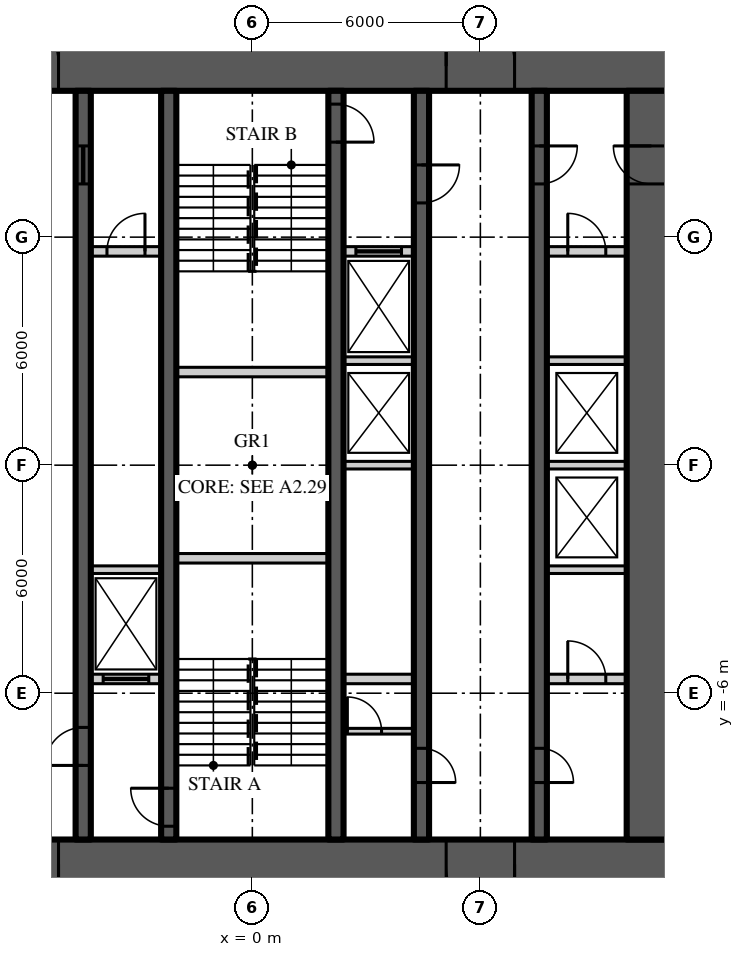
"""IFC4 building model, lengths in metres.
Left out: names, types, materials, properties, quantities, classifications, styles, units other than length and angle.
Written with IfcOpenShell. Run it as: python <this file> out.ifc"""

import sys

from ifc_helpers import new_model, si_unit, direction, frame, frame_2d, origin, place, context, subcontext, project, spatial, rectangle, extrude, element, fill, save


model = new_model("IFC4")
c1 = context("Model", 3, precision=1e-05, world=origin(), true_north=direction((0.0, 1.0)))
c2 = subcontext(c1, "Body", "Model", "MODEL_VIEW")
j1 = project(units=[si_unit("LENGTHUNIT", "METRE"), si_unit("PLANEANGLEUNIT", "RADIAN")], contexts=[c1])
p1 = place(None, origin())
s1 = spatial("IfcSite", under=j1, at=p1, CompositionType="ELEMENT")
p2 = place(p1, origin())
s2 = spatial("IfcBuilding", under=s1, at=p2, CompositionType="ELEMENT")
p3 = place(p2, frame((0.0, 0.0, 208.8)))
s3 = spatial("IfcBuildingStorey", under=s2, at=p3, CompositionType="ELEMENT", Elevation=208.8)
p4 = place(p3, frame((-11.15, 10.5, 0.0), z_axis=(0.0, 0.0, 1.0), x_axis=(1.0, 0.0, 0.0)))
e1 = element("IfcWall", 1, at=p4, inside=s3, PredefinedType="SHEAR", context=c2, shape_type="SweptSolid", body=[
    extrude(rectangle(XDim=22.3, YDim=1.3, at=frame_2d((11.15, 0.0))), origin(), (0.0, 0.0, 1.0), 3.9),
])
p5 = place(p4, frame((4.25, 0.0, 0.0)))
e2 = element("IfcOpeningElement", 2, at=p5, cuts=e1, PredefinedType="OPENING", context=c2, shape_type="SweptSolid", body=[
    extrude(rectangle(XDim=1.8, YDim=2.2, at=frame_2d((0.9, 1.1))), frame((0.0, 0.66, 0.0), z_axis=(0.0, -1.0, 0.0), x_axis=(1.0, 0.0, 0.0)), (0.0, 0.0, 1.0), 1.32),
])
p6 = place(p4, frame((16.25, 0.0, 0.0)))
e3 = element("IfcOpeningElement", 3, at=p6, cuts=e1, PredefinedType="OPENING", context=c2, shape_type="SweptSolid", body=[
    extrude(rectangle(XDim=1.8, YDim=2.2, at=frame_2d((0.9, 1.1))), frame((0.0, 0.66, 0.0), z_axis=(0.0, -1.0, 0.0), x_axis=(1.0, 0.0, 0.0)), (0.0, 0.0, 1.0), 1.32),
])
p7 = place(p3, frame((11.15, -10.5, 0.0), z_axis=(0.0, 0.0, 1.0), x_axis=(-1.0, 0.0, 0.0)))
e4 = element("IfcWall", 4, at=p7, inside=s3, PredefinedType="SHEAR", context=c2, shape_type="SweptSolid", body=[
    extrude(rectangle(XDim=22.3, YDim=1.3, at=frame_2d((11.15, 0.0))), origin(), (0.0, 0.0, 1.0), 3.9),
])
p8 = place(p7, frame((16.25, 0.0, 0.0)))
e5 = element("IfcOpeningElement", 5, at=p8, cuts=e4, PredefinedType="OPENING", context=c2, shape_type="SweptSolid", body=[
    extrude(rectangle(XDim=1.8, YDim=2.2, at=frame_2d((0.9, 1.1))), frame((0.0, 0.66, 0.0), z_axis=(0.0, -1.0, 0.0), x_axis=(1.0, 0.0, 0.0)), (0.0, 0.0, 1.0), 1.32),
])
p9 = place(p7, frame((4.25, 0.0, 0.0)))
e6 = element("IfcOpeningElement", 6, at=p9, cuts=e4, PredefinedType="OPENING", context=c2, shape_type="SweptSolid", body=[
    extrude(rectangle(XDim=1.8, YDim=2.2, at=frame_2d((0.9, 1.1))), frame((0.0, 0.66, 0.0), z_axis=(0.0, -1.0, 0.0), x_axis=(1.0, 0.0, 0.0)), (0.0, 0.0, 1.0), 1.32),
])
p10 = place(p3, frame((10.5, -9.85, 0.0), z_axis=(0.0, 0.0, 1.0), x_axis=(0.0, 1.0, 0.0)))
e7 = element("IfcWall", 7, at=p10, inside=s3, PredefinedType="SHEAR", context=c2, shape_type="SweptSolid", body=[
    extrude(rectangle(XDim=19.7, YDim=1.3, at=frame_2d((9.85, 0.0))), origin(), (0.0, 0.0, 1.0), 3.9),
])
p11 = place(p10, frame((17.25, 0.0, 0.0)))
e8 = element("IfcOpeningElement", 8, at=p11, cuts=e7, PredefinedType="OPENING", context=c2, shape_type="SweptSolid", body=[
    extrude(rectangle(XDim=1.0, YDim=2.2, at=frame_2d((0.5, 1.1))), frame((0.0, 0.66, 0.0), z_axis=(0.0, -1.0, 0.0), x_axis=(1.0, 0.0, 0.0)), (0.0, 0.0, 1.0), 1.32),
])
p12 = place(p3, frame((7.55, 9.85, 0.0), z_axis=(0.0, 0.0, 1.0), x_axis=(0.0, -1.0, 0.0)))
e9 = element("IfcWall", 9, at=p12, inside=s3, PredefinedType="SHEAR", context=c2, shape_type="SweptSolid", body=[
    extrude(rectangle(XDim=19.7, YDim=0.4, at=frame_2d((9.85, 0.0))), origin(), (0.0, 0.0, 1.0), 3.9),
])
p13 = place(p12, frame((1.45, 0.0, 0.0)))
e10 = element("IfcOpeningElement", 10, at=p13, cuts=e9, PredefinedType="OPENING", context=c2, shape_type="SweptSolid", body=[
    extrude(rectangle(XDim=1.0, YDim=2.2, at=frame_2d((0.5, 1.1))), frame((0.0, 0.21, 0.0), z_axis=(0.0, -1.0, 0.0), x_axis=(1.0, 0.0, 0.0)), (0.0, 0.0, 1.0), 0.42),
])
p14 = place(p12, frame((17.3, 0.0, 0.0)))
e11 = element("IfcOpeningElement", 11, at=p14, cuts=e9, PredefinedType="OPENING", context=c2, shape_type="SweptSolid", body=[
    extrude(rectangle(XDim=0.9, YDim=2.1, at=frame_2d((0.45, 1.05))), frame((0.0, 0.21, 0.0), z_axis=(0.0, -1.0, 0.0), x_axis=(1.0, 0.0, 0.0)), (0.0, 0.0, 1.0), 0.42),
])
p15 = place(p3, frame((-4.45, -9.85, 0.0), z_axis=(0.0, 0.0, 1.0), x_axis=(0.0, 1.0, 0.0)))
e12 = element("IfcWall", 12, at=p15, inside=s3, PredefinedType="SHEAR", context=c2, shape_type="SweptSolid", body=[
    extrude(rectangle(XDim=19.7, YDim=0.4, at=frame_2d((9.85, 0.0))), origin(), (0.0, 0.0, 1.0), 3.9),
])
p16 = place(p15, frame((1.95, 0.0, 0.0)))
e13 = element("IfcOpeningElement", 13, at=p16, cuts=e12, PredefinedType="OPENING", context=c2, shape_type="SweptSolid", body=[
    extrude(rectangle(XDim=1.0, YDim=2.2, at=frame_2d((0.5, 1.1))), frame((0.0, 0.21, 0.0), z_axis=(0.0, -1.0, 0.0), x_axis=(1.0, 0.0, 0.0)), (0.0, 0.0, 1.0), 0.42),
])
p17 = place(p15, frame((17.25, 0.0, 0.0)))
e14 = element("IfcOpeningElement", 14, at=p17, cuts=e12, PredefinedType="OPENING", context=c2, shape_type="SweptSolid", body=[
    extrude(rectangle(XDim=1.0, YDim=2.1, at=frame_2d((0.5, 1.05))), frame((0.0, 0.21, 0.0), z_axis=(0.0, -1.0, 0.0), x_axis=(1.0, 0.0, 0.0)), (0.0, 0.0, 1.0), 0.42),
])
p18 = place(p3, frame((4.45, 9.85, 0.0), z_axis=(0.0, 0.0, 1.0), x_axis=(0.0, -1.0, 0.0)))
e15 = element("IfcWall", 15, at=p18, inside=s3, PredefinedType="SHEAR", context=c2, shape_type="SweptSolid", body=[
    extrude(rectangle(XDim=19.7, YDim=0.4, at=frame_2d((9.85, 0.0))), origin(), (0.0, 0.0, 1.0), 3.9),
])
p19 = place(p18, frame((1.95, 0.0, 0.0)))
e16 = element("IfcOpeningElement", 16, at=p19, cuts=e15, PredefinedType="OPENING", context=c2, shape_type="SweptSolid", body=[
    extrude(rectangle(XDim=1.0, YDim=2.2, at=frame_2d((0.5, 1.1))), frame((0.0, 0.21, 0.0), z_axis=(0.0, -1.0, 0.0), x_axis=(1.0, 0.0, 0.0)), (0.0, 0.0, 1.0), 0.42),
])
p20 = place(p18, frame((17.3, 0.0, 0.0)))
e17 = element("IfcOpeningElement", 17, at=p20, cuts=e15, PredefinedType="OPENING", context=c2, shape_type="SweptSolid", body=[
    extrude(rectangle(XDim=0.9, YDim=2.1, at=frame_2d((0.45, 1.05))), frame((0.0, 0.21, 0.0), z_axis=(0.0, -1.0, 0.0), x_axis=(1.0, 0.0, 0.0)), (0.0, 0.0, 1.0), 0.42),
])
p21 = place(p3, frame((-2.2, -9.85, 0.0), z_axis=(0.0, 0.0, 1.0), x_axis=(0.0, 1.0, 0.0)))
e18 = element("IfcWall", 18, at=p21, inside=s3, PredefinedType="SHEAR", context=c2, shape_type="SweptSolid", body=[
    extrude(rectangle(XDim=19.7, YDim=0.4, at=frame_2d((9.85, 0.0))), origin(), (0.0, 0.0, 1.0), 3.9),
])
p22 = place(p21, frame((0.35, 0.0, 0.0)))
e19 = element("IfcOpeningElement", 19, at=p22, cuts=e18, PredefinedType="OPENING", context=c2, shape_type="SweptSolid", body=[
    extrude(rectangle(XDim=1.0, YDim=2.2, at=frame_2d((0.5, 1.1))), frame((0.0, 0.21, 0.0), z_axis=(0.0, -1.0, 0.0), x_axis=(1.0, 0.0, 0.0)), (0.0, 0.0, 1.0), 0.42),
])
p23 = place(p3, frame((2.2, 9.85, 0.0), z_axis=(0.0, 0.0, 1.0), x_axis=(0.0, -1.0, 0.0)))
e20 = element("IfcWall", 20, at=p23, inside=s3, PredefinedType="SHEAR", context=c2, shape_type="SweptSolid", body=[
    extrude(rectangle(XDim=19.7, YDim=0.4, at=frame_2d((9.85, 0.0))), origin(), (0.0, 0.0, 1.0), 3.9),
])
p24 = place(p23, frame((0.35, 0.0, 0.0)))
e21 = element("IfcOpeningElement", 21, at=p24, cuts=e20, PredefinedType="OPENING", context=c2, shape_type="SweptSolid", body=[
    extrude(rectangle(XDim=1.0, YDim=2.2, at=frame_2d((0.5, 1.1))), frame((0.0, 0.21, 0.0), z_axis=(0.0, -1.0, 0.0), x_axis=(1.0, 0.0, 0.0)), (0.0, 0.0, 1.0), 0.42),
])
p25 = place(p3, frame((-4.25, 5.625, 0.0), z_axis=(0.0, 0.0, 1.0), x_axis=(1.0, 0.0, 0.0)))
e22 = element("IfcWall", 22, at=p25, inside=s3, PredefinedType="SOLIDWALL", context=c2, shape_type="SweptSolid", body=[
    extrude(rectangle(XDim=1.85, YDim=0.25, at=frame_2d((0.925, 0.0))), origin(), (0.0, 0.0, 1.0), 3.7),
])
p26 = place(p25, frame((0.425, 0.0, 0.0)))
e23 = element("IfcOpeningElement", 23, at=p26, cuts=e22, PredefinedType="OPENING", context=c2, shape_type="SweptSolid", body=[
    extrude(rectangle(XDim=1.0, YDim=2.2, at=frame_2d((0.5, 1.1))), frame((0.0, 0.135, 0.0), z_axis=(0.0, -1.0, 0.0), x_axis=(1.0, 0.0, 0.0)), (0.0, 0.0, 1.0), 0.27),
])
p27 = place(p3, frame((2.4, 5.625, 0.0), z_axis=(0.0, 0.0, 1.0), x_axis=(1.0, 0.0, 0.0)))
e24 = element("IfcWall", 24, at=p27, inside=s3, PredefinedType="SOLIDWALL", context=c2, shape_type="SweptSolid", body=[
    extrude(rectangle(XDim=1.85, YDim=0.25, at=frame_2d((0.925, 0.0))), origin(), (0.0, 0.0, 1.0), 3.7),
])
p28 = place(p27, frame((0.325, 0.0, 0.0)))
e25 = element("IfcOpeningElement", 25, at=p28, cuts=e24, PredefinedType="OPENING", context=c2, shape_type="SweptSolid", body=[
    extrude(rectangle(XDim=1.2, YDim=2.2, at=frame_2d((0.6, 1.1))), frame((0.0, 0.135, 0.0), z_axis=(0.0, -1.0, 0.0), x_axis=(1.0, 0.0, 0.0)), (0.0, 0.0, 1.0), 0.27),
])
p29 = place(p3, frame((7.75, 5.625, 0.0), z_axis=(0.0, 0.0, 1.0), x_axis=(1.0, 0.0, 0.0)))
e26 = element("IfcWall", 26, at=p29, inside=s3, PredefinedType="SOLIDWALL", context=c2, shape_type="SweptSolid", body=[
    extrude(rectangle(XDim=2.1, YDim=0.25, at=frame_2d((1.05, 0.0))), origin(), (0.0, 0.0, 1.0), 3.7),
])
p30 = place(p29, frame((0.55, 0.0, 0.0)))
e27 = element("IfcOpeningElement", 27, at=p30, cuts=e26, PredefinedType="OPENING", context=c2, shape_type="SweptSolid", body=[
    extrude(rectangle(XDim=1.0, YDim=2.2, at=frame_2d((0.5, 1.1))), frame((0.0, 0.135, 0.0), z_axis=(0.0, -1.0, 0.0), x_axis=(1.0, 0.0, 0.0)), (0.0, 0.0, 1.0), 0.27),
])
p31 = place(p3, frame((-4.25, -5.625, 0.0), z_axis=(0.0, 0.0, 1.0), x_axis=(1.0, 0.0, 0.0)))
e28 = element("IfcWall", 28, at=p31, inside=s3, PredefinedType="SOLIDWALL", context=c2, shape_type="SweptSolid", body=[
    extrude(rectangle(XDim=1.85, YDim=0.25, at=frame_2d((0.925, 0.0))), origin(), (0.0, 0.0, 1.0), 3.7),
])
p32 = place(p31, frame((0.325, 0.0, 0.0)))
e29 = element("IfcOpeningElement", 29, at=p32, cuts=e28, PredefinedType="OPENING", context=c2, shape_type="SweptSolid", body=[
    extrude(rectangle(XDim=1.2, YDim=2.2, at=frame_2d((0.6, 1.1))), frame((0.0, 0.135, 0.0), z_axis=(0.0, -1.0, 0.0), x_axis=(1.0, 0.0, 0.0)), (0.0, 0.0, 1.0), 0.27),
])
p33 = place(p3, frame((2.4, -5.625, 0.0), z_axis=(0.0, 0.0, 1.0), x_axis=(1.0, 0.0, 0.0)))
e30 = element("IfcWall", 30, at=p33, inside=s3, PredefinedType="SOLIDWALL", context=c2, shape_type="SweptSolid", body=[
    extrude(rectangle(XDim=1.85, YDim=0.25, at=frame_2d((0.925, 0.0))), origin(), (0.0, 0.0, 1.0), 3.7),
])
p34 = place(p3, frame((7.75, -5.625, 0.0), z_axis=(0.0, 0.0, 1.0), x_axis=(1.0, 0.0, 0.0)))
e31 = element("IfcWall", 31, at=p34, inside=s3, PredefinedType="SOLIDWALL", context=c2, shape_type="SweptSolid", body=[
    extrude(rectangle(XDim=2.1, YDim=0.25, at=frame_2d((1.05, 0.0))), origin(), (0.0, 0.0, 1.0), 3.7),
])
p35 = place(p34, frame((0.55, 0.0, 0.0)))
e32 = element("IfcOpeningElement", 32, at=p35, cuts=e31, PredefinedType="OPENING", context=c2, shape_type="SweptSolid", body=[
    extrude(rectangle(XDim=1.0, YDim=2.2, at=frame_2d((0.5, 1.1))), frame((0.0, 0.135, 0.0), z_axis=(0.0, -1.0, 0.0), x_axis=(1.0, 0.0, 0.0)), (0.0, 0.0, 1.0), 0.27),
])
for number, where, z_axis, x_axis in (
    (33, (-2.0, -2.45, 0.0), (0.0, 0.0, 1.0), (1.0, 0.0, 0.0)),
    (34, (-2.0, 2.45, 0.0), (0.0, 0.0, 1.0), (1.0, 0.0, 0.0)),
):
    element("IfcWall", number, at=place(p3, frame(where, z_axis=z_axis, x_axis=x_axis)), inside=s3, PredefinedType="SOLIDWALL", context=c2, shape_type="SweptSolid", body=[
        extrude(rectangle(XDim=4.0, YDim=0.25, at=frame_2d((2.0, 0.0))), origin(), (0.0, 0.0, 1.0), 3.7),
    ])
p36 = place(p3, frame((-4.25, -2.75, 0.0), z_axis=(0.0, 0.0, 1.0), x_axis=(1.0, 0.0, 0.0)))
e35 = element("IfcWall", 35, at=p36, inside=s3, PredefinedType="SOLIDWALL", context=c2, shape_type="SweptSolid", body=[
    extrude(rectangle(XDim=1.85, YDim=0.2, at=frame_2d((0.925, 0.0))), origin(), (0.0, 0.0, 1.0), 3.7),
])
p37 = place(p3, frame((7.75, -2.75, 0.0), z_axis=(0.0, 0.0, 1.0), x_axis=(1.0, 0.0, 0.0)))
e36 = element("IfcWall", 36, at=p37, inside=s3, PredefinedType="SOLIDWALL", context=c2, shape_type="SweptSolid", body=[
    extrude(rectangle(XDim=2.1, YDim=0.2, at=frame_2d((1.05, 0.0))), origin(), (0.0, 0.0, 1.0), 3.7),
])
p38 = place(p3, frame((2.4, 0.0, 0.0), z_axis=(0.0, 0.0, 1.0), x_axis=(1.0, 0.0, 0.0)))
e37 = element("IfcWall", 37, at=p38, inside=s3, PredefinedType="SOLIDWALL", context=c2, shape_type="SweptSolid", body=[
    extrude(rectangle(XDim=1.85, YDim=0.2, at=frame_2d((0.925, 0.0))), origin(), (0.0, 0.0, 1.0), 3.7),
])
p39 = place(p3, frame((7.75, 0.0, 0.0), z_axis=(0.0, 0.0, 1.0), x_axis=(1.0, 0.0, 0.0)))
e38 = element("IfcWall", 38, at=p39, inside=s3, PredefinedType="SOLIDWALL", context=c2, shape_type="SweptSolid", body=[
    extrude(rectangle(XDim=2.1, YDim=0.2, at=frame_2d((1.05, 0.0))), origin(), (0.0, 0.0, 1.0), 3.7),
])
p40 = place(p3, frame((2.4, 2.75, 0.0), z_axis=(0.0, 0.0, 1.0), x_axis=(1.0, 0.0, 0.0)))
e39 = element("IfcWall", 39, at=p40, inside=s3, PredefinedType="SOLIDWALL", context=c2, shape_type="SweptSolid", body=[
    extrude(rectangle(XDim=1.85, YDim=0.2, at=frame_2d((0.925, 0.0))), origin(), (0.0, 0.0, 1.0), 3.7),
])
p41 = place(p3, frame((7.75, 2.75, 0.0), z_axis=(0.0, 0.0, 1.0), x_axis=(1.0, 0.0, 0.0)))
e40 = element("IfcWall", 40, at=p41, inside=s3, PredefinedType="SOLIDWALL", context=c2, shape_type="SweptSolid", body=[
    extrude(rectangle(XDim=2.1, YDim=0.2, at=frame_2d((1.05, 0.0))), origin(), (0.0, 0.0, 1.0), 3.7),
])
p42 = place(p3, frame((2.4, -7.0, 0.0), z_axis=(0.0, 0.0, 1.0), x_axis=(1.0, 0.0, 0.0)))
e41 = element("IfcWall", 41, at=p42, inside=s3, PredefinedType="SOLIDWALL", context=c2, shape_type="SweptSolid", body=[
    extrude(rectangle(XDim=1.85, YDim=0.15, at=frame_2d((0.925, 0.0))), origin(), (0.0, 0.0, 1.0), 3.77),
])
p43 = place(p42, frame((0.1, 0.0, 0.0)))
e42 = element("IfcOpeningElement", 42, at=p43, cuts=e41, PredefinedType="OPENING", context=c2, shape_type="SweptSolid", body=[
    extrude(rectangle(XDim=0.9, YDim=2.1, at=frame_2d((0.45, 1.05))), frame((0.0, 0.085, 0.0), z_axis=(0.0, -1.0, 0.0), x_axis=(1.0, 0.0, 0.0)), (0.0, 0.0, 1.0), 0.17),
])
p44 = place(p5, origin())
e43 = element("IfcDoor", 43, at=p44, inside=s3, OperationType="DOUBLE_DOOR_DOUBLE_SWING", PredefinedType="DOOR", context=c2, shape_type="SweptSolid", body=[
    extrude(rectangle(XDim=1.8, YDim=2.2, at=frame_2d((0.9, 1.1))), frame((0.0, 0.025, 0.0), z_axis=(0.0, -1.0, 0.0), x_axis=(1.0, 0.0, 0.0)), (0.0, 0.0, 1.0), 0.05),
])
fill(e2, e43)
p45 = place(p8, origin())
e44 = element("IfcDoor", 44, at=p45, inside=s3, OperationType="DOUBLE_DOOR_DOUBLE_SWING", PredefinedType="DOOR", context=c2, shape_type="SweptSolid", body=[
    extrude(rectangle(XDim=1.8, YDim=2.2, at=frame_2d((0.9, 1.1))), frame((0.0, 0.025, 0.0), z_axis=(0.0, -1.0, 0.0), x_axis=(1.0, 0.0, 0.0)), (0.0, 0.0, 1.0), 0.05),
])
fill(e5, e44)
p46 = place(p6, origin())
e45 = element("IfcDoor", 45, at=p46, inside=s3, OperationType="DOUBLE_DOOR_DOUBLE_SWING", PredefinedType="DOOR", context=c2, shape_type="SweptSolid", body=[
    extrude(rectangle(XDim=1.8, YDim=2.2, at=frame_2d((0.9, 1.1))), frame((0.0, 0.025, 0.0), z_axis=(0.0, -1.0, 0.0), x_axis=(1.0, 0.0, 0.0)), (0.0, 0.0, 1.0), 0.05),
])
fill(e3, e45)
p47 = place(p9, origin())
e46 = element("IfcDoor", 46, at=p47, inside=s3, OperationType="DOUBLE_DOOR_DOUBLE_SWING", PredefinedType="DOOR", context=c2, shape_type="SweptSolid", body=[
    extrude(rectangle(XDim=1.8, YDim=2.2, at=frame_2d((0.9, 1.1))), frame((0.0, 0.025, 0.0), z_axis=(0.0, -1.0, 0.0), x_axis=(1.0, 0.0, 0.0)), (0.0, 0.0, 1.0), 0.05),
])
fill(e6, e46)
p48 = place(p13, origin())
e47 = element("IfcDoor", 47, at=p48, inside=s3, OperationType="SINGLE_SWING_LEFT", PredefinedType="DOOR", context=c2, shape_type="SweptSolid", body=[
    extrude(rectangle(XDim=1.0, YDim=2.2, at=frame_2d((0.5, 1.1))), frame((0.0, 0.025, 0.0), z_axis=(0.0, -1.0, 0.0), x_axis=(1.0, 0.0, 0.0)), (0.0, 0.0, 1.0), 0.05),
])
fill(e10, e47)
p49 = place(p11, origin())
e48 = element("IfcDoor", 48, at=p49, inside=s3, OperationType="SINGLE_SWING_RIGHT", PredefinedType="DOOR", context=c2, shape_type="SweptSolid", body=[
    extrude(rectangle(XDim=1.0, YDim=2.2, at=frame_2d((0.5, 1.1))), frame((0.0, 0.025, 0.0), z_axis=(0.0, -1.0, 0.0), x_axis=(1.0, 0.0, 0.0)), (0.0, 0.0, 1.0), 0.05),
])
fill(e8, e48)
p50 = place(p16, origin())
e49 = element("IfcDoor", 49, at=p50, inside=s3, OperationType="SINGLE_SWING_LEFT", PredefinedType="DOOR", context=c2, shape_type="SweptSolid", body=[
    extrude(rectangle(XDim=1.0, YDim=2.2, at=frame_2d((0.5, 1.1))), frame((0.0, 0.025, 0.0), z_axis=(0.0, -1.0, 0.0), x_axis=(1.0, 0.0, 0.0)), (0.0, 0.0, 1.0), 0.05),
])
fill(e13, e49)
p51 = place(p22, origin())
e50 = element("IfcDoor", 50, at=p51, inside=s3, OperationType="SINGLE_SWING_RIGHT", PredefinedType="DOOR", context=c2, shape_type="SweptSolid", body=[
    extrude(rectangle(XDim=1.0, YDim=2.2, at=frame_2d((0.5, 1.1))), frame((0.0, 0.025, 0.0), z_axis=(0.0, -1.0, 0.0), x_axis=(1.0, 0.0, 0.0)), (0.0, 0.0, 1.0), 0.05),
])
fill(e19, e50)
p52 = place(p19, origin())
e51 = element("IfcDoor", 51, at=p52, inside=s3, OperationType="SINGLE_SWING_LEFT", PredefinedType="DOOR", context=c2, shape_type="SweptSolid", body=[
    extrude(rectangle(XDim=1.0, YDim=2.2, at=frame_2d((0.5, 1.1))), frame((0.0, 0.025, 0.0), z_axis=(0.0, -1.0, 0.0), x_axis=(1.0, 0.0, 0.0)), (0.0, 0.0, 1.0), 0.05),
])
fill(e16, e51)
p53 = place(p24, origin())
e52 = element("IfcDoor", 52, at=p53, inside=s3, OperationType="SINGLE_SWING_RIGHT", PredefinedType="DOOR", context=c2, shape_type="SweptSolid", body=[
    extrude(rectangle(XDim=1.0, YDim=2.2, at=frame_2d((0.5, 1.1))), frame((0.0, 0.025, 0.0), z_axis=(0.0, -1.0, 0.0), x_axis=(1.0, 0.0, 0.0)), (0.0, 0.0, 1.0), 0.05),
])
fill(e21, e52)
p54 = place(p17, origin())
e53 = element("IfcDoor", 53, at=p54, inside=s3, OperationType="SLIDING_TO_LEFT", PredefinedType="DOOR", context=c2, shape_type="SweptSolid", body=[
    extrude(rectangle(XDim=1.0, YDim=2.1, at=frame_2d((0.5, 1.05))), frame((0.0, 0.025, 0.0), z_axis=(0.0, -1.0, 0.0), x_axis=(1.0, 0.0, 0.0)), (0.0, 0.0, 1.0), 0.05),
])
fill(e14, e53)
p55 = place(p14, origin())
e54 = element("IfcDoor", 54, at=p55, inside=s3, OperationType="SINGLE_SWING_RIGHT", PredefinedType="DOOR", context=c2, shape_type="SweptSolid", body=[
    extrude(rectangle(XDim=0.9, YDim=2.1, at=frame_2d((0.45, 1.05))), frame((0.0, 0.025, 0.0), z_axis=(0.0, -1.0, 0.0), x_axis=(1.0, 0.0, 0.0)), (0.0, 0.0, 1.0), 0.05),
])
fill(e11, e54)
p56 = place(p20, origin())
e55 = element("IfcDoor", 55, at=p56, inside=s3, OperationType="SINGLE_SWING_RIGHT", PredefinedType="DOOR", context=c2, shape_type="SweptSolid", body=[
    extrude(rectangle(XDim=0.9, YDim=2.1, at=frame_2d((0.45, 1.05))), frame((0.0, 0.025, 0.0), z_axis=(0.0, -1.0, 0.0), x_axis=(1.0, 0.0, 0.0)), (0.0, 0.0, 1.0), 0.05),
])
fill(e17, e55)
p57 = place(p32, origin())
e56 = element("IfcDoor", 56, at=p57, inside=s3, OperationType="SLIDING_TO_LEFT", PredefinedType="DOOR", context=c2, shape_type="SweptSolid", body=[
    extrude(rectangle(XDim=1.2, YDim=2.2, at=frame_2d((0.6, 1.1))), frame((0.0, 0.025, 0.0), z_axis=(0.0, -1.0, 0.0), x_axis=(1.0, 0.0, 0.0)), (0.0, 0.0, 1.0), 0.05),
])
fill(e29, e56)
p58 = place(p28, origin())
e57 = element("IfcDoor", 57, at=p58, inside=s3, OperationType="SLIDING_TO_LEFT", PredefinedType="DOOR", context=c2, shape_type="SweptSolid", body=[
    extrude(rectangle(XDim=1.2, YDim=2.2, at=frame_2d((0.6, 1.1))), frame((0.0, 0.025, 0.0), z_axis=(0.0, -1.0, 0.0), x_axis=(1.0, 0.0, 0.0)), (0.0, 0.0, 1.0), 0.05),
])
fill(e25, e57)
p59 = place(p26, origin())
e58 = element("IfcDoor", 58, at=p59, inside=s3, OperationType="SINGLE_SWING_RIGHT", PredefinedType="DOOR", context=c2, shape_type="SweptSolid", body=[
    extrude(rectangle(XDim=1.0, YDim=2.2, at=frame_2d((0.5, 1.1))), frame((0.0, 0.025, 0.0), z_axis=(0.0, -1.0, 0.0), x_axis=(1.0, 0.0, 0.0)), (0.0, 0.0, 1.0), 0.05),
])
fill(e23, e58)
p60 = place(p30, origin())
e59 = element("IfcDoor", 59, at=p60, inside=s3, OperationType="SINGLE_SWING_LEFT", PredefinedType="DOOR", context=c2, shape_type="SweptSolid", body=[
    extrude(rectangle(XDim=1.0, YDim=2.2, at=frame_2d((0.5, 1.1))), frame((0.0, 0.025, 0.0), z_axis=(0.0, -1.0, 0.0), x_axis=(1.0, 0.0, 0.0)), (0.0, 0.0, 1.0), 0.05),
])
fill(e27, e59)
p61 = place(p35, origin())
e60 = element("IfcDoor", 60, at=p61, inside=s3, OperationType="SINGLE_SWING_LEFT", PredefinedType="DOOR", context=c2, shape_type="SweptSolid", body=[
    extrude(rectangle(XDim=1.0, YDim=2.2, at=frame_2d((0.5, 1.1))), frame((0.0, 0.025, 0.0), z_axis=(0.0, -1.0, 0.0), x_axis=(1.0, 0.0, 0.0)), (0.0, 0.0, 1.0), 0.05),
])
fill(e32, e60)
p62 = place(p43, origin())
e61 = element("IfcDoor", 61, at=p62, inside=s3, OperationType="SINGLE_SWING_LEFT", PredefinedType="DOOR", context=c2, shape_type="SweptSolid", body=[
    extrude(rectangle(XDim=0.9, YDim=2.1, at=frame_2d((0.45, 1.05))), frame((0.0, 0.025, 0.0), z_axis=(0.0, -1.0, 0.0), x_axis=(1.0, 0.0, 0.0)), (0.0, 0.0, 1.0), 0.05),
])
fill(e42, e61)
save(model, sys.argv[1])
